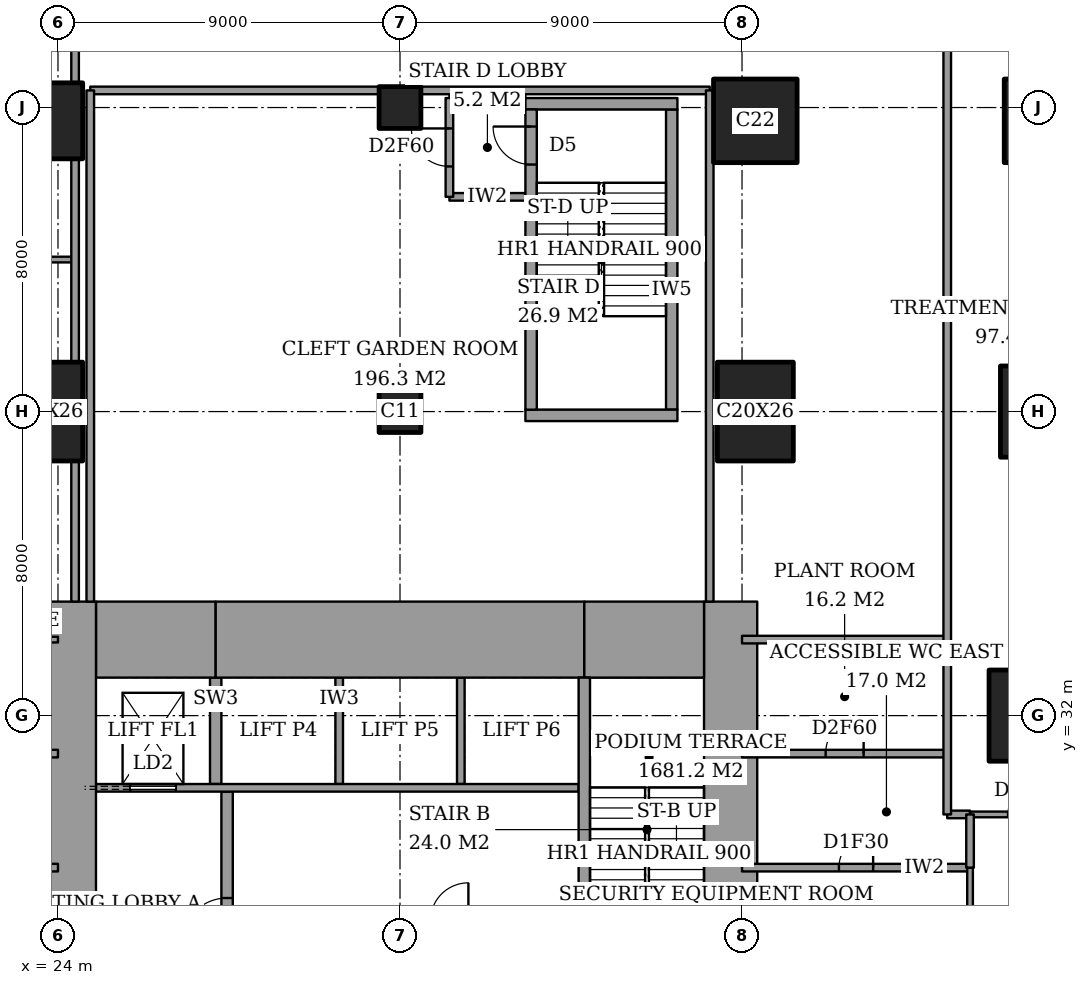
"""IFC4 building model, lengths in metres.
Left out: names, types, materials, properties, quantities, classifications, styles, units other than length and angle.
Written with IfcOpenShell. Run it as: python <this file> out.ifc"""

import sys

from ifc_helpers import new_model, si_unit, direction, frame, frame_2d, origin, origin_2d, place, context, subcontext, project, spatial, rectangle, extrude, element, fill, save


model = new_model("IFC4")
c1 = context("Model", 3, precision=1e-05, world=origin(), true_north=direction((0.0, 1.0)))
c2 = subcontext(c1, "Body", "Model", "MODEL_VIEW")
j1 = project(units=[si_unit("LENGTHUNIT", "METRE"), si_unit("PLANEANGLEUNIT", "RADIAN")], contexts=[c1])
p1 = place(None, origin())
s1 = spatial("IfcSite", under=j1, at=p1, CompositionType="ELEMENT")
p2 = place(p1, origin())
s2 = spatial("IfcBuilding", under=s1, at=p2, CompositionType="ELEMENT")
p3 = place(p2, frame((0.0, 0.0, 11.0)))
s3 = spatial("IfcBuildingStorey", under=s2, at=p3, CompositionType="ELEMENT", Elevation=11.0)
p4 = place(p3, frame((23.65, 40.0, 0.0), z_axis=(0.0, 0.0, 1.0), x_axis=(1.0, 0.0, 0.0)))
e1 = element("IfcColumn", 1, at=p4, inside=s3, PredefinedType="COLUMN", context=c2, shape_type="SweptSolid", body=[
    extrude(rectangle(XDim=2.0, YDim=2.6, at=origin_2d()), origin(), (0.0, 0.0, 1.0), 5.0),
])
p5 = place(p3, frame((23.65, 47.65, 0.0), z_axis=(0.0, 0.0, 1.0), x_axis=(1.0, 0.0, 0.0)))
e2 = element("IfcColumn", 2, at=p5, inside=s3, PredefinedType="COLUMN", context=c2, shape_type="SweptSolid", body=[
    extrude(rectangle(XDim=2.0, YDim=2.0, at=origin_2d()), origin(), (0.0, 0.0, 1.0), 5.0),
])
for number, where, z_axis, x_axis in (
    (3, (33.0, 40.0, 0.0), (0.0, 0.0, 1.0), (1.0, 0.0, 0.0)),
    (4, (33.0, 48.0, 0.0), (0.0, 0.0, 1.0), (1.0, 0.0, 0.0)),
):
    element("IfcColumn", number, at=place(p3, frame(where, z_axis=z_axis, x_axis=x_axis)), inside=s3, PredefinedType="COLUMN", context=c2, shape_type="SweptSolid", body=[
        extrude(rectangle(XDim=1.1, YDim=1.1, at=origin_2d()), origin(), (0.0, 0.0, 1.0), 5.0),
    ])
p6 = place(p3, frame((42.35, 40.0, 0.0), z_axis=(0.0, 0.0, 1.0), x_axis=(1.0, 0.0, 0.0)))
e5 = element("IfcColumn", 5, at=p6, inside=s3, PredefinedType="COLUMN", context=c2, shape_type="SweptSolid", body=[
    extrude(rectangle(XDim=2.0, YDim=2.6, at=origin_2d()), origin(), (0.0, 0.0, 1.0), 5.0),
])
p7 = place(p3, frame((42.35, 47.65, 0.0), z_axis=(0.0, 0.0, 1.0), x_axis=(1.0, 0.0, 0.0)))
e6 = element("IfcColumn", 6, at=p7, inside=s3, PredefinedType="COLUMN", context=c2, shape_type="SweptSolid", body=[
    extrude(rectangle(XDim=2.2, YDim=2.2, at=origin_2d()), origin(), (0.0, 0.0, 1.0), 5.0),
])
p8 = place(p3, frame((50.0, 32.0, 0.0), z_axis=(0.0, 0.0, 1.0), x_axis=(1.0, 0.0, 0.0)))
e7 = element("IfcColumn", 7, at=p8, inside=s3, PredefinedType="COLUMN", context=c2, shape_type="SweptSolid", body=[
    extrude(rectangle(XDim=3.0, YDim=2.4, at=origin_2d()), origin(), (0.0, 0.0, 1.0), 5.0),
])
p9 = place(p3, frame((50.0, 40.0, 0.0), z_axis=(0.0, 0.0, 1.0), x_axis=(1.0, 0.0, 0.0)))
e8 = element("IfcColumn", 8, at=p9, inside=s3, PredefinedType="COLUMN", context=c2, shape_type="SweptSolid", body=[
    extrude(rectangle(XDim=2.4, YDim=2.4, at=origin_2d()), origin(), (0.0, 0.0, 1.0), 5.0),
])
p10 = place(p3, frame((50.0, 47.65, 0.0), z_axis=(0.0, 0.0, 1.0), x_axis=(1.0, 0.0, 0.0)))
e9 = element("IfcColumn", 9, at=p10, inside=s3, PredefinedType="COLUMN", context=c2, shape_type="SweptSolid", body=[
    extrude(rectangle(XDim=2.2, YDim=2.2, at=origin_2d()), origin(), (0.0, 0.0, 1.0), 5.0),
])
p11 = place(p3, frame((25.0, 34.0, 0.0), z_axis=(0.0, 0.0, 1.0), x_axis=(1.0, 0.0, 0.0)))
e10 = element("IfcWall", 10, at=p11, inside=s3, PredefinedType="SHEAR", context=c2, shape_type="SweptSolid", body=[
    extrude(rectangle(XDim=3.15, YDim=2.0, at=frame_2d((1.575, 0.0))), origin(), (0.0, 0.0, 1.0), 5.0),
])
p12 = place(p3, frame((28.15, 34.0, 0.0), z_axis=(0.0, 0.0, 1.0), x_axis=(1.0, 0.0, 0.0)))
e11 = element("IfcWall", 11, at=p12, inside=s3, PredefinedType="SHEAR", context=c2, shape_type="SweptSolid", body=[
    extrude(rectangle(XDim=9.7, YDim=2.0, at=frame_2d((4.85, 0.0))), origin(), (0.0, 0.0, 1.0), 5.0),
])
p13 = place(p3, frame((37.85, 34.0, 0.0), z_axis=(0.0, 0.0, 1.0), x_axis=(1.0, 0.0, 0.0)))
e12 = element("IfcWall", 12, at=p13, inside=s3, PredefinedType="SHEAR", context=c2, shape_type="SweptSolid", body=[
    extrude(rectangle(XDim=3.15, YDim=2.0, at=frame_2d((1.575, 0.0))), origin(), (0.0, 0.0, 1.0), 5.0),
])
p14 = place(p3, frame((24.3, 23.15, 0.0), z_axis=(0.0, 0.0, 1.0), x_axis=(0.0, 1.0, 0.0)))
e13 = element("IfcWall", 13, at=p14, inside=s3, PredefinedType="SHEAR", context=c2, shape_type="SweptSolid", body=[
    extrude(rectangle(XDim=11.85, YDim=1.4, at=frame_2d((5.925, 0.0))), origin(), (0.0, 0.0, 1.0), 5.0),
])
p15 = place(p14, frame((0.75, 0.0, 0.0)))
e14 = element("IfcOpeningElement", 14, at=p15, cuts=e13, PredefinedType="OPENING", context=c2, shape_type="SweptSolid", body=[
    extrude(rectangle(XDim=1.8, YDim=2.4, at=frame_2d((0.9, 1.2))), frame((0.0, 0.71, 0.0), z_axis=(0.0, -1.0, 0.0), x_axis=(1.0, 0.0, 0.0)), (0.0, 0.0, 1.0), 1.42),
])
p16 = place(p3, frame((41.7, 24.85, 0.0), z_axis=(0.0, 0.0, 1.0), x_axis=(0.0, 1.0, 0.0)))
e15 = element("IfcWall", 15, at=p16, inside=s3, PredefinedType="SHEAR", context=c2, shape_type="SweptSolid", body=[
    extrude(rectangle(XDim=10.15, YDim=1.4, at=frame_2d((5.075, 0.0))), origin(), (0.0, 0.0, 1.0), 5.0),
])
p17 = place(p3, frame((37.85, 24.85, 0.0), z_axis=(0.0, 0.0, 1.0), x_axis=(0.0, 1.0, 0.0)))
e16 = element("IfcWall", 16, at=p17, inside=s3, PredefinedType="SHEAR", context=c2, shape_type="SweptSolid", body=[
    extrude(rectangle(XDim=8.15, YDim=0.3, at=frame_2d((4.075, 0.0))), origin(), (0.0, 0.0, 1.0), 5.0),
])
p18 = place(p3, frame((28.45, 23.3, 0.0), z_axis=(0.0, 0.0, 1.0), x_axis=(0.0, 1.0, 0.0)))
e17 = element("IfcWall", 17, at=p18, inside=s3, PredefinedType="PARTITIONING", context=c2, shape_type="SweptSolid", body=[
    extrude(rectangle(XDim=6.7, YDim=0.3, at=frame_2d((3.35, 0.0))), origin(), (0.0, 0.0, 1.0), 5.0),
])
p19 = place(p18, frame((2.7, 0.0, 0.0)))
e18 = element("IfcOpeningElement", 18, at=p19, cuts=e17, PredefinedType="OPENING", context=c2, shape_type="SweptSolid", body=[
    extrude(rectangle(XDim=1.2, YDim=2.1, at=frame_2d((0.6, 1.05))), frame((0.0, 0.16, 0.0), z_axis=(0.0, -1.0, 0.0), x_axis=(1.0, 0.0, 0.0)), (0.0, 0.0, 1.0), 0.32),
])
p20 = place(p3, frame((18.9, 28.0, 0.0), z_axis=(0.0, 0.0, 1.0), x_axis=(1.0, 0.0, 0.0)))
e19 = element("IfcWall", 19, at=p20, inside=s3, PredefinedType="PARTITIONING", context=c2, shape_type="SweptSolid", body=[
    extrude(rectangle(XDim=5.1, YDim=0.2, at=frame_2d((2.55, 0.0))), origin(), (0.0, 0.0, 1.0), 4.7),
])
p21 = place(p3, frame((42.0, 28.0, 0.0), z_axis=(0.0, 0.0, 1.0), x_axis=(1.0, 0.0, 0.0)))
e20 = element("IfcWall", 20, at=p21, inside=s3, PredefinedType="PARTITIONING", context=c2, shape_type="SweptSolid", body=[
    extrude(rectangle(XDim=6.0, YDim=0.2, at=frame_2d((3.0, 0.0))), origin(), (0.0, 0.0, 1.0), 4.7),
])
p22 = place(p21, frame((2.55, 0.0, 0.0)))
e21 = element("IfcOpeningElement", 21, at=p22, cuts=e20, PredefinedType="OPENING", context=c2, shape_type="SweptSolid", body=[
    extrude(rectangle(XDim=0.9, YDim=2.1, at=frame_2d((0.45, 1.05))), frame((0.0, 0.11, 0.0), z_axis=(0.0, -1.0, 0.0), x_axis=(1.0, 0.0, 0.0)), (0.0, 0.0, 1.0), 0.22),
])
p23 = place(p3, frame((47.4, 29.4, 0.0), z_axis=(0.0, 0.0, 1.0), x_axis=(1.0, 0.0, 0.0)))
e22 = element("IfcWall", 22, at=p23, inside=s3, PredefinedType="PARTITIONING", context=c2, shape_type="SweptSolid", body=[
    extrude(rectangle(XDim=0.6, YDim=0.2, at=frame_2d((0.3, 0.0))), origin(), (0.0, 0.0, 1.0), 4.7),
])
p24 = place(p3, frame((48.0, 29.4, 0.0), z_axis=(0.0, 0.0, 1.0), x_axis=(1.0, 0.0, 0.0)))
e23 = element("IfcWall", 23, at=p24, inside=s3, PredefinedType="PARTITIONING", context=c2, shape_type="SweptSolid", body=[
    extrude(rectangle(XDim=3.0, YDim=0.15, at=frame_2d((1.5, 0.0))), origin(), (0.0, 0.0, 1.0), 4.7),
])
p25 = place(p24, frame((1.0, 0.0, 0.0)))
e24 = element("IfcOpeningElement", 24, at=p25, cuts=e23, PredefinedType="OPENING", context=c2, shape_type="SweptSolid", body=[
    extrude(rectangle(XDim=1.0, YDim=2.1, at=frame_2d((0.5, 1.05))), frame((0.0, 0.085, 0.0), z_axis=(0.0, -1.0, 0.0), x_axis=(1.0, 0.0, 0.0)), (0.0, 0.0, 1.0), 0.17),
])
p26 = place(p3, frame((18.9, 31.0, 0.0), z_axis=(0.0, 0.0, 1.0), x_axis=(1.0, 0.0, 0.0)))
e25 = element("IfcWall", 25, at=p26, inside=s3, PredefinedType="PARTITIONING", context=c2, shape_type="SweptSolid", body=[
    extrude(rectangle(XDim=5.1, YDim=0.2, at=frame_2d((2.55, 0.0))), origin(), (0.0, 0.0, 1.0), 4.7),
])
p27 = place(p3, frame((42.0, 31.0, 0.0), z_axis=(0.0, 0.0, 1.0), x_axis=(1.0, 0.0, 0.0)))
e26 = element("IfcWall", 26, at=p27, inside=s3, PredefinedType="PARTITIONING", context=c2, shape_type="SweptSolid", body=[
    extrude(rectangle(XDim=5.4, YDim=0.2, at=frame_2d((2.7, 0.0))), origin(), (0.0, 0.0, 1.0), 4.7),
])
p28 = place(p27, frame((2.2, 0.0, 0.0)))
e27 = element("IfcOpeningElement", 27, at=p28, cuts=e26, PredefinedType="OPENING", context=c2, shape_type="SweptSolid", body=[
    extrude(rectangle(XDim=1.0, YDim=2.1, at=frame_2d((0.5, 1.05))), frame((0.0, 0.11, 0.0), z_axis=(0.0, -1.0, 0.0), x_axis=(1.0, 0.0, 0.0)), (0.0, 0.0, 1.0), 0.22),
])
p29 = place(p3, frame((42.0, 34.0, 0.0), z_axis=(0.0, 0.0, 1.0), x_axis=(1.0, 0.0, 0.0)))
e28 = element("IfcWall", 28, at=p29, inside=s3, PredefinedType="PARTITIONING", context=c2, shape_type="SweptSolid", body=[
    extrude(rectangle(XDim=5.4, YDim=0.2, at=frame_2d((2.7, 0.0))), origin(), (0.0, 0.0, 1.0), 4.7),
])
p30 = place(p3, frame((18.9, 34.0, 0.0), z_axis=(0.0, 0.0, 1.0), x_axis=(1.0, 0.0, 0.0)))
e29 = element("IfcWall", 29, at=p30, inside=s3, PredefinedType="PARTITIONING", context=c2, shape_type="SweptSolid", body=[
    extrude(rectangle(XDim=5.1, YDim=0.15, at=frame_2d((2.55, 0.0))), origin(), (0.0, 0.0, 1.0), 4.7),
])
p31 = place(p3, frame((10.0, 44.0, 0.0), z_axis=(0.0, 0.0, 1.0), x_axis=(1.0, 0.0, 0.0)))
e30 = element("IfcWall", 30, at=p31, inside=s3, PredefinedType="PARTITIONING", context=c2, shape_type="SweptSolid", body=[
    extrude(rectangle(XDim=14.45, YDim=0.15, at=frame_2d((7.225, 0.0))), origin(), (0.0, 0.0, 1.0), 4.7),
])
p32 = place(p31, frame((9.325, 0.0, 0.0)))
e31 = element("IfcOpeningElement", 31, at=p32, cuts=e30, PredefinedType="OPENING", context=c2, shape_type="SweptSolid", body=[
    extrude(rectangle(XDim=1.8, YDim=2.1, at=frame_2d((0.9, 1.05))), frame((0.0, 0.085, 0.0), z_axis=(0.0, -1.0, 0.0), x_axis=(1.0, 0.0, 0.0)), (0.0, 0.0, 1.0), 0.17),
])
for number, where, z_axis, x_axis in (
    (32, (34.3, 45.65, 0.0), (0.0, 0.0, 1.0), (1.0, 0.0, 0.0)),
    (33, (34.3, 48.25, 0.0), (0.0, 0.0, 1.0), (1.0, 0.0, 0.0)),
):
    element("IfcWall", number, at=place(p3, frame(where, z_axis=z_axis, x_axis=x_axis)), inside=s3, PredefinedType="PARTITIONING", context=c2, shape_type="SweptSolid", body=[
        extrude(rectangle(XDim=2.0, YDim=0.2, at=frame_2d((1.0, 0.0))), origin(), (0.0, 0.0, 1.0), 4.7),
    ])
for number, where, z_axis, x_axis in (
    (34, (24.85, 48.45, 0.0), (0.0, 0.0, 1.0), (1.0, 0.0, 0.0)),
    (35, (33.55, 48.45, 0.0), (0.0, 0.0, 1.0), (1.0, 0.0, 0.0)),
):
    element("IfcWall", number, at=place(p3, frame(where, z_axis=z_axis, x_axis=x_axis)), inside=s3, PredefinedType="PARTITIONING", context=c2, shape_type="SweptSolid", body=[
        extrude(rectangle(XDim=7.6, YDim=0.2, at=frame_2d((3.8, 0.0))), origin(), (0.0, 0.0, 1.0), 4.7),
    ])
p33 = place(p3, frame((24.45, 35.0, 0.0), z_axis=(0.0, 0.0, 1.0), x_axis=(0.0, 1.0, 0.0)))
e36 = element("IfcWall", 36, at=p33, inside=s3, PredefinedType="PARTITIONING", context=c2, shape_type="SweptSolid", body=[
    extrude(rectangle(XDim=3.7, YDim=0.2, at=frame_2d((1.85, 0.0))), origin(), (0.0, 0.0, 1.0), 4.7),
])
p34 = place(p3, frame((24.45, 41.3, 0.0), z_axis=(0.0, 0.0, 1.0), x_axis=(0.0, 1.0, 0.0)))
e37 = element("IfcWall", 37, at=p34, inside=s3, PredefinedType="PARTITIONING", context=c2, shape_type="SweptSolid", body=[
    extrude(rectangle(XDim=5.35, YDim=0.2, at=frame_2d((2.675, 0.0))), origin(), (0.0, 0.0, 1.0), 4.7),
])
p35 = place(p3, frame((24.45, 48.65, 0.0), z_axis=(0.0, 0.0, 1.0), x_axis=(0.0, 1.0, 0.0)))
e38 = element("IfcWall", 38, at=p35, inside=s3, PredefinedType="PARTITIONING", context=c2, shape_type="SweptSolid", body=[
    extrude(rectangle(XDim=6.8, YDim=0.2, at=frame_2d((3.4, 0.0))), origin(), (0.0, 0.0, 1.0), 4.7),
])
p36 = place(p3, frame((24.85, 35.0, 0.0), z_axis=(0.0, 0.0, 1.0), x_axis=(0.0, 1.0, 0.0)))
e39 = element("IfcWall", 39, at=p36, inside=s3, PredefinedType="PARTITIONING", context=c2, shape_type="SweptSolid", body=[
    extrude(rectangle(XDim=13.45, YDim=0.2, at=frame_2d((6.725, 0.0))), origin(), (0.0, 0.0, 1.0), 4.7),
])
p37 = place(p3, frame((34.3, 45.65, 0.0), z_axis=(0.0, 0.0, 1.0), x_axis=(0.0, 1.0, 0.0)))
e40 = element("IfcWall", 40, at=p37, inside=s3, PredefinedType="PARTITIONING", context=c2, shape_type="SweptSolid", body=[
    extrude(rectangle(XDim=2.6, YDim=0.2, at=frame_2d((1.3, 0.0))), origin(), (0.0, 0.0, 1.0), 4.7),
])
p38 = place(p37, frame((0.8, 0.0, 0.0)))
e41 = element("IfcOpeningElement", 41, at=p38, cuts=e40, PredefinedType="OPENING", context=c2, shape_type="SweptSolid", body=[
    extrude(rectangle(XDim=1.0, YDim=2.1, at=frame_2d((0.5, 1.05))), frame((0.0, 0.11, 0.0), z_axis=(0.0, -1.0, 0.0), x_axis=(1.0, 0.0, 0.0)), (0.0, 0.0, 1.0), 0.22),
])
p39 = place(p3, frame((41.15, 35.0, 0.0), z_axis=(0.0, 0.0, 1.0), x_axis=(0.0, 1.0, 0.0)))
e42 = element("IfcWall", 42, at=p39, inside=s3, PredefinedType="PARTITIONING", context=c2, shape_type="SweptSolid", body=[
    extrude(rectangle(XDim=13.45, YDim=0.2, at=frame_2d((6.725, 0.0))), origin(), (0.0, 0.0, 1.0), 4.7),
])
p40 = place(p3, frame((47.4, 29.4, 0.0), z_axis=(0.0, 0.0, 1.0), x_axis=(0.0, 1.0, 0.0)))
e43 = element("IfcWall", 43, at=p40, inside=s3, PredefinedType="PARTITIONING", context=c2, shape_type="SweptSolid", body=[
    extrude(rectangle(XDim=27.161, YDim=0.2, at=frame_2d((13.581, 0.0))), origin(), (0.0, 0.0, 1.0), 4.7),
])
p41 = place(p3, frame((48.0, 28.0, 0.0), z_axis=(0.0, 0.0, 1.0), x_axis=(0.0, 1.0, 0.0)))
e44 = element("IfcWall", 44, at=p41, inside=s3, PredefinedType="PARTITIONING", context=c2, shape_type="SweptSolid", body=[
    extrude(rectangle(XDim=1.4, YDim=0.2, at=frame_2d((0.7, 0.0))), origin(), (0.0, 0.0, 1.0), 4.7),
])
p42 = place(p3, frame((48.0, 14.0, 0.0), z_axis=(0.0, 0.0, 1.0), x_axis=(0.0, 1.0, 0.0)))
e45 = element("IfcWall", 45, at=p42, inside=s3, PredefinedType="PARTITIONING", context=c2, shape_type="SweptSolid", body=[
    extrude(rectangle(XDim=14.0, YDim=0.15, at=frame_2d((7.0, 0.0))), origin(), (0.0, 0.0, 1.0), 4.7),
])
p43 = place(p42, frame((10.3, 0.0, 0.0)))
e46 = element("IfcOpeningElement", 46, at=p43, cuts=e45, PredefinedType="OPENING", context=c2, shape_type="SweptSolid", body=[
    extrude(rectangle(XDim=1.8, YDim=2.1, at=frame_2d((0.9, 1.05))), frame((0.0, 0.085, 0.0), z_axis=(0.0, -1.0, 0.0), x_axis=(1.0, 0.0, 0.0)), (0.0, 0.0, 1.0), 0.17),
])
p44 = place(p3, frame((25.0, 30.1, 0.0), z_axis=(0.0, 0.0, 1.0), x_axis=(1.0, 0.0, 0.0)))
e47 = element("IfcWall", 47, at=p44, inside=s3, PredefinedType="PARTITIONING", context=c2, shape_type="SweptSolid", body=[
    extrude(rectangle(XDim=12.7, YDim=0.2, at=frame_2d((6.35, 0.0))), origin(), (0.0, 0.0, 1.0), 5.0),
])
p45 = place(p44, frame((0.9, 0.0, 0.0)))
e48 = element("IfcOpeningElement", 48, at=p45, cuts=e47, PredefinedType="OPENING", context=c2, shape_type="SweptSolid", body=[
    extrude(rectangle(XDim=1.2, YDim=2.1, at=frame_2d((0.6, 1.05))), frame((0.0, 0.11, 0.0), z_axis=(0.0, -1.0, 0.0), x_axis=(1.0, 0.0, 0.0)), (0.0, 0.0, 1.0), 0.22),
])
for number, where, z_axis, x_axis in (
    (49, (31.4, 30.2, 0.0), (0.0, 0.0, 1.0), (0.0, 1.0, 0.0)),
    (50, (34.6, 30.2, 0.0), (0.0, 0.0, 1.0), (0.0, 1.0, 0.0)),
):
    element("IfcWall", number, at=place(p3, frame(where, z_axis=z_axis, x_axis=x_axis)), inside=s3, PredefinedType="PARTITIONING", context=c2, shape_type="SweptSolid", body=[
        extrude(rectangle(XDim=2.8, YDim=0.2, at=frame_2d((1.4, 0.0))), origin(), (0.0, 0.0, 1.0), 5.0),
    ])
p46 = place(p3, frame((28.15, 30.2, 0.0), z_axis=(0.0, 0.0, 1.0), x_axis=(0.0, 1.0, 0.0)))
e51 = element("IfcWall", 51, at=p46, inside=s3, PredefinedType="SHEAR", context=c2, shape_type="SweptSolid", body=[
    extrude(rectangle(XDim=2.8, YDim=0.3, at=frame_2d((1.4, 0.0))), origin(), (0.0, 0.0, 1.0), 5.0),
])
for number, where, z_axis, x_axis in (
    (52, (36.3, 39.9, 0.0), (0.0, 0.0, 1.0), (1.0, 0.0, 0.0)),
    (53, (36.3, 48.1, 0.0), (0.0, 0.0, 1.0), (1.0, 0.0, 0.0)),
):
    element("IfcWall", number, at=place(p3, frame(where, z_axis=z_axis, x_axis=x_axis)), inside=s3, PredefinedType="PARTITIONING", context=c2, shape_type="SweptSolid", body=[
        extrude(rectangle(XDim=4.0, YDim=0.3, at=frame_2d((2.0, 0.0))), origin(), (0.0, 0.0, 1.0), 5.0),
    ])
p47 = place(p3, frame((36.45, 40.05, 0.0), z_axis=(0.0, 0.0, 1.0), x_axis=(0.0, 1.0, 0.0)))
e54 = element("IfcWall", 54, at=p47, inside=s3, PredefinedType="PARTITIONING", context=c2, shape_type="SweptSolid", body=[
    extrude(rectangle(XDim=7.9, YDim=0.3, at=frame_2d((3.95, 0.0))), origin(), (0.0, 0.0, 1.0), 5.0),
])
p48 = place(p47, frame((6.45, 0.0, 0.0)))
e55 = element("IfcOpeningElement", 55, at=p48, cuts=e54, PredefinedType="OPENING", context=c2, shape_type="SweptSolid", body=[
    extrude(rectangle(XDim=1.0, YDim=2.1, at=frame_2d((0.5, 1.05))), frame((0.0, 0.16, 0.0), z_axis=(0.0, -1.0, 0.0), x_axis=(1.0, 0.0, 0.0)), (0.0, 0.0, 1.0), 0.32),
])
p49 = place(p3, frame((40.15, 40.05, 0.0), z_axis=(0.0, 0.0, 1.0), x_axis=(0.0, 1.0, 0.0)))
e56 = element("IfcWall", 56, at=p49, inside=s3, PredefinedType="PARTITIONING", context=c2, shape_type="SweptSolid", body=[
    extrude(rectangle(XDim=7.9, YDim=0.3, at=frame_2d((3.95, 0.0))), origin(), (0.0, 0.0, 1.0), 5.0),
])
p50 = place(p22, origin())
e57 = element("IfcDoor", 57, at=p50, inside=s3, OperationType="SINGLE_SWING_LEFT", PredefinedType="DOOR", context=c2, shape_type="SweptSolid", body=[
    extrude(rectangle(XDim=0.9, YDim=2.1, at=frame_2d((0.45, 1.05))), frame((0.0, 0.025, 0.0), z_axis=(0.0, -1.0, 0.0), x_axis=(1.0, 0.0, 0.0)), (0.0, 0.0, 1.0), 0.05),
])
fill(e21, e57)
p51 = place(p28, origin())
e58 = element("IfcDoor", 58, at=p51, inside=s3, OperationType="SINGLE_SWING_LEFT", PredefinedType="DOOR", context=c2, shape_type="SweptSolid", body=[
    extrude(rectangle(XDim=1.0, YDim=2.1, at=frame_2d((0.5, 1.05))), frame((0.0, 0.025, 0.0), z_axis=(0.0, -1.0, 0.0), x_axis=(1.0, 0.0, 0.0)), (0.0, 0.0, 1.0), 0.05),
])
fill(e27, e58)
p52 = place(p38, origin())
e59 = element("IfcDoor", 59, at=p52, inside=s3, OperationType="SINGLE_SWING_LEFT", PredefinedType="DOOR", context=c2, shape_type="SweptSolid", body=[
    extrude(rectangle(XDim=1.0, YDim=2.1, at=frame_2d((0.5, 1.05))), frame((0.0, 0.025, 0.0), z_axis=(0.0, -1.0, 0.0), x_axis=(1.0, 0.0, 0.0)), (0.0, 0.0, 1.0), 0.05),
])
fill(e41, e59)
p53 = place(p19, origin())
e60 = element("IfcDoor", 60, at=p53, inside=s3, OperationType="SINGLE_SWING_RIGHT", PredefinedType="DOOR", context=c2, shape_type="SweptSolid", body=[
    extrude(rectangle(XDim=1.2, YDim=2.1, at=frame_2d((0.6, 1.05))), frame((0.0, 0.025, 0.0), z_axis=(0.0, -1.0, 0.0), x_axis=(1.0, 0.0, 0.0)), (0.0, 0.0, 1.0), 0.05),
])
fill(e18, e60)
p54 = place(p45, origin())
e61 = element("IfcDoor", 61, at=p54, inside=s3, OperationType="SLIDING_TO_LEFT", PredefinedType="DOOR", context=c2, shape_type="SweptSolid", body=[
    extrude(rectangle(XDim=1.2, YDim=2.1, at=frame_2d((0.6, 1.05))), frame((0.0, 0.025, 0.0), z_axis=(0.0, -1.0, 0.0), x_axis=(1.0, 0.0, 0.0)), (0.0, 0.0, 1.0), 0.05),
])
fill(e48, e61)
p55 = place(p48, origin())
e62 = element("IfcDoor", 62, at=p55, inside=s3, OperationType="SINGLE_SWING_LEFT", PredefinedType="DOOR", context=c2, shape_type="SweptSolid", body=[
    extrude(rectangle(XDim=1.0, YDim=2.1, at=frame_2d((0.5, 1.05))), frame((0.0, 0.025, 0.0), z_axis=(0.0, -1.0, 0.0), x_axis=(1.0, 0.0, 0.0)), (0.0, 0.0, 1.0), 0.05),
])
fill(e55, e62)
save(model, sys.argv[1])
